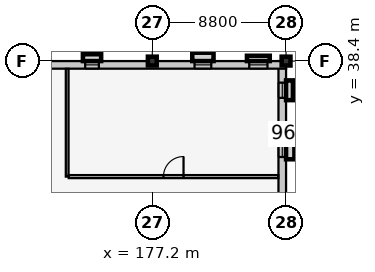
"""IFC4 building model, lengths in metres.
Left out: names, types, materials, properties, quantities, classifications, styles, units other than length and angle.
Written with IfcOpenShell. Run it as: python <this file> out.ifc"""

import sys

from ifc_helpers import new_model, si_unit, direction, frame, frame_2d, origin, origin_2d, place, context, subcontext, project, spatial, rectangle, extrude, element, fill, save


model = new_model("IFC4")
c1 = context("Model", 3, precision=1e-05, world=origin(), true_north=direction((0.0, 1.0)))
c2 = subcontext(c1, "Body", "Model", "MODEL_VIEW")
j1 = project(units=[si_unit("LENGTHUNIT", "METRE"), si_unit("PLANEANGLEUNIT", "RADIAN")], contexts=[c1])
p1 = place(None, origin())
s1 = spatial("IfcSite", under=j1, at=p1, CompositionType="ELEMENT")
p2 = place(p1, origin())
s2 = spatial("IfcBuilding", under=s1, at=p2, CompositionType="ELEMENT")
p3 = place(p2, origin())
s3 = spatial("IfcBuildingStorey", under=s2, at=p3, CompositionType="ELEMENT", Elevation=0.0)
for number, where, z_axis, x_axis in (
    (1, (177.2, 38.4, 0.0), (0.0, 0.0, 1.0), (1.0, 0.0, 0.0)),
    (2, (186.0, 38.4, 0.0), (0.0, 0.0, 1.0), (1.0, 0.0, 0.0)),
):
    element("IfcColumn", number, at=place(p3, frame(where, z_axis=z_axis, x_axis=x_axis)), inside=s3, PredefinedType="COLUMN", context=c2, shape_type="SweptSolid", body=[
        extrude(rectangle(XDim=0.58, YDim=0.58, at=origin_2d()), origin(), (0.0, 0.0, 1.0), 5.4),
    ])
p4 = place(p3, frame((185.75, 38.4, 0.0), z_axis=(0.0, 0.0, 1.0), x_axis=(0.0, -1.0, 0.0)))
e3 = element("IfcWall", 3, at=p4, inside=s3, PredefinedType="SOLIDWALL", context=c2, shape_type="SweptSolid", body=[
    extrude(rectangle(XDim=38.4, YDim=0.5, at=frame_2d((19.2, 0.0))), origin(), (0.0, 0.0, 1.0), 4.275),
])
p5 = place(p4, frame((1.42, 0.0, 0.9)))
e4 = element("IfcOpeningElement", 4, at=p5, cuts=e3, PredefinedType="OPENING", context=c2, shape_type="SweptSolid", body=[
    extrude(rectangle(XDim=1.0, YDim=1.35, at=frame_2d((0.5, 0.675))), frame((0.0, 0.262, 0.0), z_axis=(0.0, -1.0, 0.0), x_axis=(1.0, 0.0, 0.0)), (0.0, 0.0, 1.0), 0.524),
])
p6 = place(p4, frame((5.21, 0.0, 0.9)))
e5 = element("IfcOpeningElement", 5, at=p6, cuts=e3, PredefinedType="OPENING", context=c2, shape_type="SweptSolid", body=[
    extrude(rectangle(XDim=1.1, YDim=1.35, at=frame_2d((0.55, 0.675))), frame((0.0, 0.262, 0.0), z_axis=(0.0, -1.0, 0.0), x_axis=(1.0, 0.0, 0.0)), (0.0, 0.0, 1.0), 0.524),
])
p7 = place(p4, frame((20.645, 0.0, 0.9)))
e6 = element("IfcOpeningElement", 6, at=p7, cuts=e3, PredefinedType="OPENING", context=c2, shape_type="SweptSolid", body=[
    extrude(rectangle(XDim=0.95, YDim=1.45, at=frame_2d((0.475, 0.725))), frame((0.0, 0.262, 0.0), z_axis=(0.0, -1.0, 0.0), x_axis=(1.0, 0.0, 0.0)), (0.0, 0.0, 1.0), 0.524),
])
p8 = place(p4, frame((28.225, 0.0, 0.9)))
e7 = element("IfcOpeningElement", 7, at=p8, cuts=e3, PredefinedType="OPENING", context=c2, shape_type="SweptSolid", body=[
    extrude(rectangle(XDim=1.15, YDim=1.45, at=frame_2d((0.575, 0.725))), frame((0.0, 0.262, 0.0), z_axis=(0.0, -1.0, 0.0), x_axis=(1.0, 0.0, 0.0)), (0.0, 0.0, 1.0), 0.524),
])
p9 = place(p4, frame((35.805, 0.0, 0.9)))
e8 = element("IfcOpeningElement", 8, at=p9, cuts=e3, PredefinedType="OPENING", context=c2, shape_type="SweptSolid", body=[
    extrude(rectangle(XDim=1.35, YDim=1.45, at=frame_2d((0.675, 0.725))), frame((0.0, 0.262, 0.0), z_axis=(0.0, -1.0, 0.0), x_axis=(1.0, 0.0, 0.0)), (0.0, 0.0, 1.0), 0.524),
])
p10 = place(p3, frame((124.0, 38.15, 0.0), z_axis=(0.0, 0.0, 1.0), x_axis=(1.0, 0.0, 0.0)))
e9 = element("IfcWall", 9, at=p10, inside=s3, PredefinedType="SOLIDWALL", context=c2, shape_type="SweptSolid", body=[
    extrude(rectangle(XDim=62.0, YDim=0.5, at=frame_2d((31.0, 0.0))), origin(), (0.0, 0.0, 1.0), 4.275),
])
p11 = place(p10, frame((17.1, 0.0, 0.0)))
e10 = element("IfcOpeningElement", 10, at=p11, cuts=e9, PredefinedType="OPENING", context=c2, shape_type="SweptSolid", body=[
    extrude(rectangle(XDim=1.8, YDim=2.3, at=frame_2d((0.9, 1.15))), frame((0.0, 0.262, 0.0), z_axis=(0.0, -1.0, 0.0), x_axis=(1.0, 0.0, 0.0)), (0.0, 0.0, 1.0), 0.524),
])
p12 = place(p10, frame((1.098, 0.0, 0.9)))
e11 = element("IfcOpeningElement", 11, at=p12, cuts=e9, PredefinedType="OPENING", context=c2, shape_type="SweptSolid", body=[
    extrude(rectangle(XDim=1.45, YDim=1.45, at=frame_2d((0.725, 0.725))), frame((0.0, 0.262, 0.0), z_axis=(0.0, -1.0, 0.0), x_axis=(1.0, 0.0, 0.0)), (0.0, 0.0, 1.0), 0.524),
])
p13 = place(p10, frame((26.853, 0.0, 0.9)))
e12 = element("IfcOpeningElement", 12, at=p13, cuts=e9, PredefinedType="OPENING", context=c2, shape_type="SweptSolid", body=[
    extrude(rectangle(XDim=1.0, YDim=1.75, at=frame_2d((0.5, 0.875))), frame((0.0, 0.262, 0.0), z_axis=(0.0, -1.0, 0.0), x_axis=(1.0, 0.0, 0.0)), (0.0, 0.0, 1.0), 0.524),
])
p14 = place(p10, frame((37.624, 0.0, 0.9)))
e13 = element("IfcOpeningElement", 13, at=p14, cuts=e9, PredefinedType="OPENING", context=c2, shape_type="SweptSolid", body=[
    extrude(rectangle(XDim=1.34, YDim=1.75, at=frame_2d((0.67, 0.875))), frame((0.0, 0.262, 0.0), z_axis=(0.0, -1.0, 0.0), x_axis=(1.0, 0.0, 0.0)), (0.0, 0.0, 1.0), 0.524),
])
p15 = place(p10, frame((41.221, 0.0, 0.9)))
e14 = element("IfcOpeningElement", 14, at=p15, cuts=e9, PredefinedType="OPENING", context=c2, shape_type="SweptSolid", body=[
    extrude(rectangle(XDim=1.44, YDim=1.75, at=frame_2d((0.72, 0.875))), frame((0.0, 0.262, 0.0), z_axis=(0.0, -1.0, 0.0), x_axis=(1.0, 0.0, 0.0)), (0.0, 0.0, 1.0), 0.524),
])
p16 = place(p10, frame((48.785, 0.0, 0.9)))
e15 = element("IfcOpeningElement", 15, at=p16, cuts=e9, PredefinedType="OPENING", context=c2, shape_type="SweptSolid", body=[
    extrude(rectangle(XDim=0.9, YDim=1.35, at=frame_2d((0.45, 0.675))), frame((0.0, 0.262, 0.0), z_axis=(0.0, -1.0, 0.0), x_axis=(1.0, 0.0, 0.0)), (0.0, 0.0, 1.0), 0.524),
])
p17 = place(p10, frame((55.979, 0.0, 0.9)))
e16 = element("IfcOpeningElement", 16, at=p17, cuts=e9, PredefinedType="OPENING", context=c2, shape_type="SweptSolid", body=[
    extrude(rectangle(XDim=1.1, YDim=1.35, at=frame_2d((0.55, 0.675))), frame((0.0, 0.262, 0.0), z_axis=(0.0, -1.0, 0.0), x_axis=(1.0, 0.0, 0.0)), (0.0, 0.0, 1.0), 0.524),
])
p18 = place(p10, frame((59.576, 0.0, 0.9)))
e17 = element("IfcOpeningElement", 17, at=p18, cuts=e9, PredefinedType="OPENING", context=c2, shape_type="SweptSolid", body=[
    extrude(rectangle(XDim=1.2, YDim=1.35, at=frame_2d((0.6, 0.675))), frame((0.0, 0.262, 0.0), z_axis=(0.0, -1.0, 0.0), x_axis=(1.0, 0.0, 0.0)), (0.0, 0.0, 1.0), 0.524),
])
p19 = place(p3, frame((171.6, 30.8, 0.0), z_axis=(0.0, 0.0, 1.0), x_axis=(0.0, 1.0, 0.0)))
e18 = element("IfcWall", 18, at=p19, inside=s3, PredefinedType="PARTITIONING", context=c2, shape_type="SweptSolid", body=[
    extrude(rectangle(XDim=7.09, YDim=0.18, at=frame_2d((3.545, 0.0))), origin(), (0.0, 0.0, 1.0), 5.12),
])
p20 = place(p3, frame((171.7, 30.8, 0.0), z_axis=(0.0, 0.0, 1.0), x_axis=(1.0, 0.0, 0.0)))
e19 = element("IfcWall", 19, at=p20, inside=s3, PredefinedType="PARTITIONING", context=c2, shape_type="SweptSolid", body=[
    extrude(rectangle(XDim=13.79, YDim=0.2, at=frame_2d((6.895, 0.0))), origin(), (0.0, 0.0, 1.0), 5.12),
])
p21 = place(p20, frame((6.235, 0.0, 0.0)))
e20 = element("IfcOpeningElement", 20, at=p21, cuts=e19, PredefinedType="OPENING", context=c2, shape_type="SweptSolid", body=[
    extrude(rectangle(XDim=1.32, YDim=2.15, at=frame_2d((0.66, 1.075))), frame((0.0, 0.112, 0.0), z_axis=(0.0, -1.0, 0.0), x_axis=(1.0, 0.0, 0.0)), (0.0, 0.0, 1.0), 0.224),
])
p22 = place(p5, origin())
e21 = element("IfcWindow", 21, at=p22, inside=s3, PartitioningType="SINGLE_PANEL", PredefinedType="WINDOW", context=c2, shape_type="SweptSolid", body=[
    extrude(rectangle(XDim=1.0, YDim=1.35, at=frame_2d((0.5, 0.675))), frame((0.0, 0.03, 0.0), z_axis=(0.0, -1.0, 0.0), x_axis=(1.0, 0.0, 0.0)), (0.0, 0.0, 1.0), 0.06),
])
fill(e4, e21)
p23 = place(p6, origin())
e22 = element("IfcWindow", 22, at=p23, inside=s3, PartitioningType="SINGLE_PANEL", PredefinedType="WINDOW", context=c2, shape_type="SweptSolid", body=[
    extrude(rectangle(XDim=1.1, YDim=1.35, at=frame_2d((0.55, 0.675))), frame((0.0, 0.03, 0.0), z_axis=(0.0, -1.0, 0.0), x_axis=(1.0, 0.0, 0.0)), (0.0, 0.0, 1.0), 0.06),
])
fill(e5, e22)
p24 = place(p16, origin())
e23 = element("IfcWindow", 23, at=p24, inside=s3, PartitioningType="SINGLE_PANEL", PredefinedType="WINDOW", context=c2, shape_type="SweptSolid", body=[
    extrude(rectangle(XDim=0.9, YDim=1.35, at=frame_2d((0.45, 0.675))), frame((0.0, 0.03, 0.0), z_axis=(0.0, -1.0, 0.0), x_axis=(1.0, 0.0, 0.0)), (0.0, 0.0, 1.0), 0.06),
])
fill(e15, e23)
p25 = place(p17, origin())
e24 = element("IfcWindow", 24, at=p25, inside=s3, PartitioningType="SINGLE_PANEL", PredefinedType="WINDOW", context=c2, shape_type="SweptSolid", body=[
    extrude(rectangle(XDim=1.1, YDim=1.35, at=frame_2d((0.55, 0.675))), frame((0.0, 0.03, 0.0), z_axis=(0.0, -1.0, 0.0), x_axis=(1.0, 0.0, 0.0)), (0.0, 0.0, 1.0), 0.06),
])
fill(e16, e24)
p26 = place(p18, origin())
e25 = element("IfcWindow", 25, at=p26, inside=s3, PartitioningType="SINGLE_PANEL", PredefinedType="WINDOW", context=c2, shape_type="SweptSolid", body=[
    extrude(rectangle(XDim=1.2, YDim=1.35, at=frame_2d((0.6, 0.675))), frame((0.0, 0.03, 0.0), z_axis=(0.0, -1.0, 0.0), x_axis=(1.0, 0.0, 0.0)), (0.0, 0.0, 1.0), 0.06),
])
fill(e17, e25)
p27 = place(p21, origin())
e26 = element("IfcDoor", 26, at=p27, inside=s3, OperationType="SINGLE_SWING_RIGHT", PredefinedType="DOOR", context=c2, shape_type="SweptSolid", body=[
    extrude(rectangle(XDim=1.32, YDim=2.15, at=frame_2d((0.66, 1.075))), frame((0.0, 0.025, 0.0), z_axis=(0.0, -1.0, 0.0), x_axis=(1.0, 0.0, 0.0)), (0.0, 0.0, 1.0), 0.05),
])
fill(e20, e26)
save(model, sys.argv[1])
